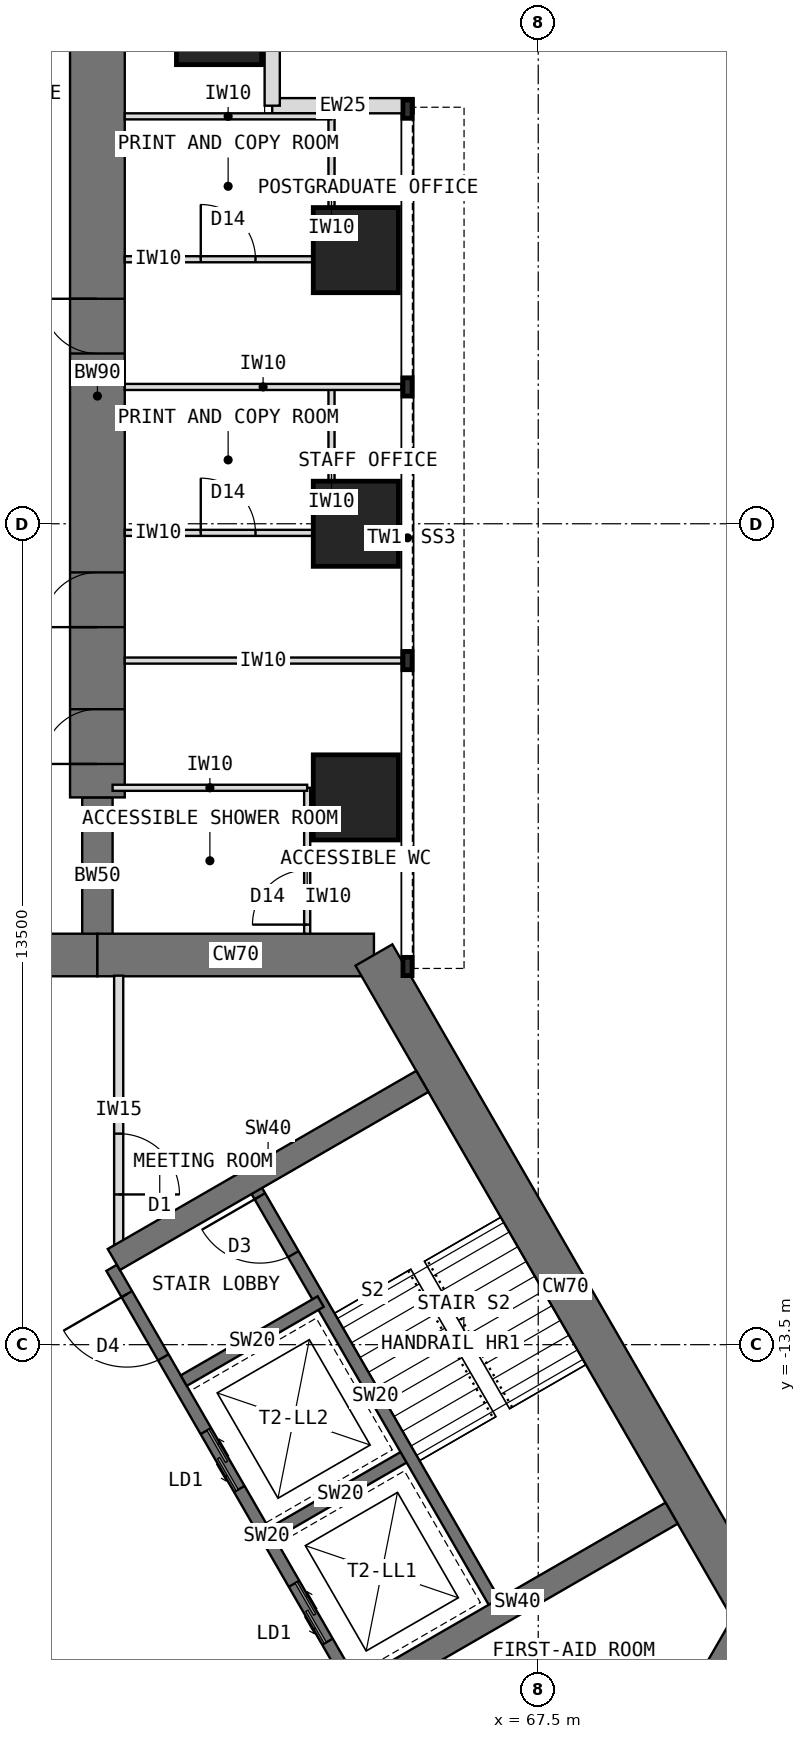
"""IFC4 building model, lengths in metres.
Left out: names, types, materials, properties, quantities, classifications, styles, units other than length and angle.
Written with IfcOpenShell. Run it as: python <this file> out.ifc"""

import sys

from ifc_helpers import new_model, si_unit, direction, frame, frame_2d, origin, origin_2d, place, context, subcontext, project, spatial, rectangle, extrude, element, fill, save


model = new_model("IFC4")
c1 = context("Model", 3, precision=1e-05, world=origin(), true_north=direction((0.0, 1.0)))
c2 = subcontext(c1, "Body", "Model", "MODEL_VIEW")
j1 = project(units=[si_unit("LENGTHUNIT", "METRE"), si_unit("PLANEANGLEUNIT", "RADIAN")], contexts=[c1])
p1 = place(None, origin())
s1 = spatial("IfcSite", under=j1, at=p1, CompositionType="ELEMENT")
p2 = place(p1, origin())
s2 = spatial("IfcBuilding", under=s1, at=p2, CompositionType="ELEMENT")
p3 = place(p2, frame((0.0, 0.0, 84.5)))
s3 = spatial("IfcBuildingStorey", under=s2, at=p3, CompositionType="ELEMENT", Elevation=84.5)
p4 = place(p3, frame((64.798, -7.092, 0.0), z_axis=(0.0, 0.0, 1.0), x_axis=(-1.0, 0.0, 0.0)))
e1 = element("IfcWall", 1, at=p4, inside=s3, PredefinedType="SHEAR", context=c2, shape_type="SweptSolid", body=[
    extrude(rectangle(XDim=4.548, YDim=0.7, at=frame_2d((2.274, 0.0))), origin(), (0.0, 0.0, 1.0), 4.0),
])
p5 = place(p3, frame((60.25, -7.092, 0.0), z_axis=(0.0, 0.0, 1.0), x_axis=(-1.0, 0.0, 0.0)))
e2 = element("IfcWall", 2, at=p5, inside=s3, PredefinedType="SHEAR", context=c2, shape_type="SweptSolid", body=[
    extrude(rectangle(XDim=3.5, YDim=0.7, at=frame_2d((1.75, 0.0))), origin(), (0.0, 0.0, 1.0), 4.0),
])
p6 = place(p5, frame((0.85, 0.0, 0.0)))
e3 = element("IfcOpeningElement", 3, at=p6, cuts=e2, PredefinedType="OPENING", context=c2, shape_type="SweptSolid", body=[
    extrude(rectangle(XDim=1.8, YDim=2.1, at=frame_2d((0.9, 1.05))), frame((0.0, 0.36, 0.0), z_axis=(0.0, -1.0, 0.0), x_axis=(1.0, 0.0, 0.0)), (0.0, 0.0, 1.0), 0.72),
])
p7 = place(p3, frame((68.822, -21.939, 0.0), z_axis=(0.0, 0.0, 1.0), x_axis=(0.500024481964, 0.866011268655, 0.0)))
e4 = element("IfcWall", 4, at=p7, inside=s3, PredefinedType="SHEAR", context=c2, shape_type="SweptSolid", body=[
    extrude(rectangle(XDim=4.548, YDim=0.7, at=frame_2d((2.274, 0.0))), origin(), (0.0, 0.0, 1.0), 4.0),
])
p8 = place(p3, frame((71.096, -18.0, 0.0), z_axis=(0.0, 0.0, 1.0), x_axis=(-0.500005998175, 0.866021940709, 0.0)))
e5 = element("IfcWall", 5, at=p8, inside=s3, PredefinedType="SHEAR", context=c2, shape_type="SweptSolid", body=[
    extrude(rectangle(XDim=12.596, YDim=0.7, at=frame_2d((6.298, 0.0))), origin(), (0.0, 0.0, 1.0), 4.0),
])
p9 = place(p3, frame((60.25, -7.092, 0.0), z_axis=(0.0, 0.0, 1.0), x_axis=(0.0, 1.0, 0.0)))
e6 = element("IfcWall", 6, at=p9, inside=s3, PredefinedType="SHEAR", context=c2, shape_type="SweptSolid", body=[
    extrude(rectangle(XDim=2.592, YDim=0.5, at=frame_2d((1.296, 0.0))), origin(), (0.0, 0.0, 1.0), 4.0),
])
p10 = place(p3, frame((60.25, -4.5, 0.0), z_axis=(0.0, 0.0, 1.0), x_axis=(0.0, 1.0, 0.0)))
e7 = element("IfcWall", 7, at=p10, inside=s3, PredefinedType="SHEAR", context=c2, shape_type="SweptSolid", body=[
    extrude(rectangle(XDim=13.2, YDim=0.9, at=frame_2d((6.6, 0.0))), origin(), (0.0, 0.0, 1.0), 4.0),
])
p11 = place(p10, frame((0.55, 0.0, 0.0)))
e8 = element("IfcOpeningElement", 8, at=p11, cuts=e7, PredefinedType="OPENING", context=c2, shape_type="SweptSolid", body=[
    extrude(rectangle(XDim=0.9, YDim=2.1, at=frame_2d((0.45, 1.05))), frame((0.0, 0.46, 0.0), z_axis=(0.0, -1.0, 0.0), x_axis=(1.0, 0.0, 0.0)), (0.0, 0.0, 1.0), 0.92),
])
p12 = place(p10, frame((2.8, 0.0, 0.0)))
e9 = element("IfcOpeningElement", 9, at=p12, cuts=e7, PredefinedType="OPENING", context=c2, shape_type="SweptSolid", body=[
    extrude(rectangle(XDim=0.9, YDim=2.1, at=frame_2d((0.45, 1.05))), frame((0.0, 0.46, 0.0), z_axis=(0.0, -1.0, 0.0), x_axis=(1.0, 0.0, 0.0)), (0.0, 0.0, 1.0), 0.92),
])
p13 = place(p10, frame((7.3, 0.0, 0.0)))
e10 = element("IfcOpeningElement", 10, at=p13, cuts=e7, PredefinedType="OPENING", context=c2, shape_type="SweptSolid", body=[
    extrude(rectangle(XDim=0.9, YDim=2.1, at=frame_2d((0.45, 1.05))), frame((0.0, 0.46, 0.0), z_axis=(0.0, -1.0, 0.0), x_axis=(1.0, 0.0, 0.0)), (0.0, 0.0, 1.0), 0.92),
])
for number, where, z_axis, x_axis in (
    (11, (64.5, -4.5, 0.0), (0.0, 0.0, 1.0), (1.0, 0.0, 0.0)),
    (12, (64.5, 0.0, 0.0), (0.0, 0.0, 1.0), (1.0, 0.0, 0.0)),
    (13, (64.5, 4.5, 0.0), (0.0, 0.0, 1.0), (1.0, 0.0, 0.0)),
    (14, (62.25, 8.25, 0.0), (0.0, 0.0, 1.0), (1.0, 0.0, 0.0)),
):
    element("IfcColumn", number, at=place(p3, frame(where, z_axis=z_axis, x_axis=x_axis)), inside=s3, PredefinedType="COLUMN", context=c2, shape_type="SweptSolid", body=[
        extrude(rectangle(XDim=1.4, YDim=1.4, at=origin_2d()), origin(), (0.0, 0.0, 1.0), 4.0),
    ])
for number, where, z_axis, x_axis in (
    (15, (65.45, 6.875, 0.0), (0.0, 0.0, 1.0), (-1.0, 0.0, 0.0)),
    (16, (63.125, 6.875, 0.0), (0.0, 0.0, 1.0), (0.0, 1.0, 0.0)),
):
    element("IfcWall", number, at=place(p3, frame(where, z_axis=z_axis, x_axis=x_axis)), inside=s3, PredefinedType="STANDARD", context=c2, shape_type="SweptSolid", body=[
        extrude(rectangle(XDim=2.325, YDim=0.25, at=frame_2d((1.163, 0.0))), origin(), (0.0, 0.0, 1.0), 3.8),
    ])
p14 = place(p3, frame((64.484, -19.164, 0.0), z_axis=(0.0, 0.0, 1.0), x_axis=(-0.49999894854, 0.866026010844, 0.0)))
e17 = element("IfcWall", 17, at=p14, inside=s3, PredefinedType="SHEAR", context=c2, shape_type="SweptSolid", body=[
    extrude(rectangle(XDim=8.0, YDim=0.2, at=frame_2d((4.0, 0.0))), origin(), (0.0, 0.0, 1.0), 4.0),
])
p15 = place(p14, frame((6.3, 0.0, 0.0)))
e18 = element("IfcOpeningElement", 18, at=p15, cuts=e17, PredefinedType="OPENING", context=c2, shape_type="SweptSolid", body=[
    extrude(rectangle(XDim=1.2, YDim=2.1, at=frame_2d((0.6, 1.05))), frame((0.0, 0.11, 0.0), z_axis=(0.0, -1.0, 0.0), x_axis=(1.0, 0.0, 0.0)), (0.0, 0.0, 1.0), 0.22),
])
p16 = place(p14, frame((0.9, 0.0, 0.0)))
e19 = element("IfcOpeningElement", 19, at=p16, cuts=e17, PredefinedType="OPENING", context=c2, shape_type="SweptSolid", body=[
    extrude(rectangle(XDim=1.1, YDim=2.2, at=frame_2d((0.55, 1.1))), frame((0.0, 0.11, 0.0), z_axis=(0.0, -1.0, 0.0), x_axis=(1.0, 0.0, 0.0)), (0.0, 0.0, 1.0), 0.22),
])
p17 = place(p14, frame((3.8, 0.0, 0.0)))
e20 = element("IfcOpeningElement", 20, at=p17, cuts=e17, PredefinedType="OPENING", context=c2, shape_type="SweptSolid", body=[
    extrude(rectangle(XDim=1.1, YDim=2.2, at=frame_2d((0.55, 1.1))), frame((0.0, 0.11, 0.0), z_axis=(0.0, -1.0, 0.0), x_axis=(1.0, 0.0, 0.0)), (0.0, 0.0, 1.0), 0.22),
])
p18 = place(p3, frame((63.12, -16.603, 0.0), z_axis=(0.0, 0.0, 1.0), x_axis=(0.866062058628, 0.499936506574, 0.0)))
e21 = element("IfcWall", 21, at=p18, inside=s3, PredefinedType="SHEAR", context=c2, shape_type="SweptSolid", body=[
    extrude(rectangle(XDim=2.6, YDim=0.2, at=frame_2d((1.3, 0.0))), origin(), (0.0, 0.0, 1.0), 4.0),
])
p19 = place(p3, frame((61.67, -14.091, 0.0), z_axis=(0.0, 0.0, 1.0), x_axis=(0.86603858612, 0.49997716683, 0.0)))
e22 = element("IfcWall", 22, at=p19, inside=s3, PredefinedType="SHEAR", context=c2, shape_type="SweptSolid", body=[
    extrude(rectangle(XDim=2.6, YDim=0.2, at=frame_2d((1.3, 0.0))), origin(), (0.0, 0.0, 1.0), 4.0),
])
p20 = place(p3, frame((66.822, -17.814, 0.0), z_axis=(0.0, 0.0, 1.0), x_axis=(-0.49999894854, 0.866026010844, 0.0)))
e23 = element("IfcWall", 23, at=p20, inside=s3, PredefinedType="SHEAR", context=c2, shape_type="SweptSolid", body=[
    extrude(rectangle(XDim=8.0, YDim=0.2, at=frame_2d((4.0, 0.0))), origin(), (0.0, 0.0, 1.0), 4.0),
])
p21 = place(p20, frame((6.7, 0.0, 0.0)))
e24 = element("IfcOpeningElement", 24, at=p21, cuts=e23, PredefinedType="OPENING", context=c2, shape_type="SweptSolid", body=[
    extrude(rectangle(XDim=1.1, YDim=2.1, at=frame_2d((0.55, 1.05))), frame((0.0, 0.11, 0.0), z_axis=(0.0, -1.0, 0.0), x_axis=(1.0, 0.0, 0.0)), (0.0, 0.0, 1.0), 0.22),
])
for number, where, z_axis, x_axis in (
    (25, (60.52, -12.099, 0.0), (0.0, 0.0, 1.0), (0.866, 0.5, 0.0)),
    (26, (64.62, -19.201, 0.0), (0.0, 0.0, 1.0), (0.866, 0.5, 0.0)),
):
    element("IfcWall", number, at=place(p3, frame(where, z_axis=z_axis, x_axis=x_axis)), inside=s3, PredefinedType="SHEAR", context=c2, shape_type="SweptSolid", body=[
        extrude(rectangle(XDim=5.858, YDim=0.4, at=frame_2d((2.929, 0.0))), origin(), (0.0, 0.0, 1.0), 4.0),
    ])
for number, where, z_axis, x_axis in (
    (27, (60.7, -2.25, 0.0), (0.0, 0.0, 1.0), (1.0, 0.0, 0.0)),
    (28, (60.7, 2.25, 0.0), (0.0, 0.0, 1.0), (1.0, 0.0, 0.0)),
):
    element("IfcWall", number, at=place(p3, frame(where, z_axis=z_axis, x_axis=x_axis)), inside=s3, PredefinedType="PARTITIONING", context=c2, shape_type="SweptSolid", body=[
        extrude(rectangle(XDim=4.55, YDim=0.1, at=frame_2d((2.275, 0.0))), origin(), (0.0, 0.0, 1.0), 3.8),
    ])
p22 = place(p3, frame((64.1, -0.15, 0.0), z_axis=(0.0, 0.0, 1.0), x_axis=(0.0, 1.0, 0.0)))
e29 = element("IfcWall", 29, at=p22, inside=s3, PredefinedType="PARTITIONING", context=c2, shape_type="SweptSolid", body=[
    extrude(rectangle(XDim=2.4, YDim=0.1, at=frame_2d((1.2, 0.0))), origin(), (0.0, 0.0, 1.0), 3.8),
])
p23 = place(p3, frame((60.7, -0.15, 0.0), z_axis=(0.0, 0.0, 1.0), x_axis=(1.0, 0.0, 0.0)))
e30 = element("IfcWall", 30, at=p23, inside=s3, PredefinedType="PARTITIONING", context=c2, shape_type="SweptSolid", body=[
    extrude(rectangle(XDim=3.4, YDim=0.1, at=frame_2d((1.7, 0.0))), origin(), (0.0, 0.0, 1.0), 3.8),
])
p24 = place(p23, frame((1.25, 0.0, 0.0)))
e31 = element("IfcOpeningElement", 31, at=p24, cuts=e30, PredefinedType="OPENING", context=c2, shape_type="SweptSolid", body=[
    extrude(rectangle(XDim=0.9, YDim=2.1, at=frame_2d((0.45, 1.05))), frame((0.0, 0.06, 0.0), z_axis=(0.0, -1.0, 0.0), x_axis=(1.0, 0.0, 0.0)), (0.0, 0.0, 1.0), 0.12),
])
p25 = place(p3, frame((64.1, 4.35, 0.0), z_axis=(0.0, 0.0, 1.0), x_axis=(0.0, 1.0, 0.0)))
e32 = element("IfcWall", 32, at=p25, inside=s3, PredefinedType="PARTITIONING", context=c2, shape_type="SweptSolid", body=[
    extrude(rectangle(XDim=2.4, YDim=0.1, at=frame_2d((1.2, 0.0))), origin(), (0.0, 0.0, 1.0), 3.8),
])
p26 = place(p3, frame((60.7, 4.35, 0.0), z_axis=(0.0, 0.0, 1.0), x_axis=(1.0, 0.0, 0.0)))
e33 = element("IfcWall", 33, at=p26, inside=s3, PredefinedType="PARTITIONING", context=c2, shape_type="SweptSolid", body=[
    extrude(rectangle(XDim=3.4, YDim=0.1, at=frame_2d((1.7, 0.0))), origin(), (0.0, 0.0, 1.0), 3.8),
])
p27 = place(p26, frame((1.25, 0.0, 0.0)))
e34 = element("IfcOpeningElement", 34, at=p27, cuts=e33, PredefinedType="OPENING", context=c2, shape_type="SweptSolid", body=[
    extrude(rectangle(XDim=0.9, YDim=2.1, at=frame_2d((0.45, 1.05))), frame((0.0, 0.06, 0.0), z_axis=(0.0, -1.0, 0.0), x_axis=(1.0, 0.0, 0.0)), (0.0, 0.0, 1.0), 0.12),
])
p28 = place(p3, frame((60.7, 6.7, 0.0), z_axis=(0.0, 0.0, 1.0), x_axis=(1.0, 0.0, 0.0)))
e35 = element("IfcWall", 35, at=p28, inside=s3, PredefinedType="PARTITIONING", context=c2, shape_type="SweptSolid", body=[
    extrude(rectangle(XDim=3.4, YDim=0.1, at=frame_2d((1.7, 0.0))), origin(), (0.0, 0.0, 1.0), 3.8),
])
p29 = place(p3, frame((63.7, -6.742, 0.0), z_axis=(0.0, 0.0, 1.0), x_axis=(0.0, 1.0, 0.0)))
e36 = element("IfcWall", 36, at=p29, inside=s3, PredefinedType="PARTITIONING", context=c2, shape_type="SweptSolid", body=[
    extrude(rectangle(XDim=2.4, YDim=0.1, at=frame_2d((1.2, 0.0))), origin(), (0.0, 0.0, 1.0), 3.8),
])
p30 = place(p29, frame((0.15, 0.0, 0.0)))
e37 = element("IfcOpeningElement", 37, at=p30, cuts=e36, PredefinedType="OPENING", context=c2, shape_type="SweptSolid", body=[
    extrude(rectangle(XDim=0.9, YDim=2.1, at=frame_2d((0.45, 1.05))), frame((0.0, 0.06, 0.0), z_axis=(0.0, -1.0, 0.0), x_axis=(1.0, 0.0, 0.0)), (0.0, 0.0, 1.0), 0.12),
])
p31 = place(p3, frame((60.5, -4.342, 0.0), z_axis=(0.0, 0.0, 1.0), x_axis=(1.0, 0.0, 0.0)))
e38 = element("IfcWall", 38, at=p31, inside=s3, PredefinedType="PARTITIONING", context=c2, shape_type="SweptSolid", body=[
    extrude(rectangle(XDim=3.2, YDim=0.1, at=frame_2d((1.6, 0.0))), origin(), (0.0, 0.0, 1.0), 3.8),
])
p32 = place(p3, frame((60.6, -7.432, 0.0), z_axis=(0.0, 0.0, 1.0), x_axis=(0.0, -1.0, 0.0)))
e39 = element("IfcWall", 39, at=p32, inside=s3, PredefinedType="PARTITIONING", context=c2, shape_type="SweptSolid", body=[
    extrude(rectangle(XDim=4.426, YDim=0.15, at=frame_2d((2.213, 0.0))), origin(), (0.0, 0.0, 1.0), 3.8),
])
p33 = place(p32, frame((2.598, 0.0, 0.0)))
e40 = element("IfcOpeningElement", 40, at=p33, cuts=e39, PredefinedType="OPENING", context=c2, shape_type="SweptSolid", body=[
    extrude(rectangle(XDim=1.0, YDim=2.1, at=frame_2d((0.5, 1.05))), frame((0.0, 0.085, 0.0), z_axis=(0.0, -1.0, 0.0), x_axis=(1.0, 0.0, 0.0)), (0.0, 0.0, 1.0), 0.17),
])
p34 = place(p15, origin())
e41 = element("IfcDoor", 41, at=p34, inside=s3, OperationType="SINGLE_SWING_RIGHT", PredefinedType="DOOR", context=c2, shape_type="SweptSolid", body=[
    extrude(rectangle(XDim=1.2, YDim=2.1, at=frame_2d((0.6, 1.05))), frame((0.0, 0.025, 0.0), z_axis=(0.0, -1.0, 0.0), x_axis=(1.0, 0.0, 0.0)), (0.0, 0.0, 1.0), 0.05),
])
fill(e18, e41)
p35 = place(p16, origin())
e42 = element("IfcDoor", 42, at=p35, inside=s3, OperationType="DOUBLE_DOOR_SLIDING", PredefinedType="DOOR", context=c2, shape_type="SweptSolid", body=[
    extrude(rectangle(XDim=1.1, YDim=2.2, at=frame_2d((0.55, 1.1))), frame((0.0, 0.025, 0.0), z_axis=(0.0, -1.0, 0.0), x_axis=(1.0, 0.0, 0.0)), (0.0, 0.0, 1.0), 0.05),
])
fill(e19, e42)
p36 = place(p17, origin())
e43 = element("IfcDoor", 43, at=p36, inside=s3, OperationType="DOUBLE_DOOR_SLIDING", PredefinedType="DOOR", context=c2, shape_type="SweptSolid", body=[
    extrude(rectangle(XDim=1.1, YDim=2.2, at=frame_2d((0.55, 1.1))), frame((0.0, 0.025, 0.0), z_axis=(0.0, -1.0, 0.0), x_axis=(1.0, 0.0, 0.0)), (0.0, 0.0, 1.0), 0.05),
])
fill(e20, e43)
p37 = place(p21, origin())
e44 = element("IfcDoor", 44, at=p37, inside=s3, OperationType="SINGLE_SWING_RIGHT", PredefinedType="DOOR", context=c2, shape_type="SweptSolid", body=[
    extrude(rectangle(XDim=1.1, YDim=2.1, at=frame_2d((0.55, 1.05))), frame((0.0, 0.025, 0.0), z_axis=(0.0, -1.0, 0.0), x_axis=(1.0, 0.0, 0.0)), (0.0, 0.0, 1.0), 0.05),
])
fill(e24, e44)
p38 = place(p24, origin())
e45 = element("IfcDoor", 45, at=p38, inside=s3, OperationType="SINGLE_SWING_LEFT", PredefinedType="DOOR", context=c2, shape_type="SweptSolid", body=[
    extrude(rectangle(XDim=0.9, YDim=2.1, at=frame_2d((0.45, 1.05))), frame((0.0, 0.025, 0.0), z_axis=(0.0, -1.0, 0.0), x_axis=(1.0, 0.0, 0.0)), (0.0, 0.0, 1.0), 0.05),
])
fill(e31, e45)
p39 = place(p27, origin())
e46 = element("IfcDoor", 46, at=p39, inside=s3, OperationType="SINGLE_SWING_LEFT", PredefinedType="DOOR", context=c2, shape_type="SweptSolid", body=[
    extrude(rectangle(XDim=0.9, YDim=2.1, at=frame_2d((0.45, 1.05))), frame((0.0, 0.025, 0.0), z_axis=(0.0, -1.0, 0.0), x_axis=(1.0, 0.0, 0.0)), (0.0, 0.0, 1.0), 0.05),
])
fill(e34, e46)
p40 = place(p30, origin())
e47 = element("IfcDoor", 47, at=p40, inside=s3, OperationType="SINGLE_SWING_LEFT", PredefinedType="DOOR", context=c2, shape_type="SweptSolid", body=[
    extrude(rectangle(XDim=0.9, YDim=2.1, at=frame_2d((0.45, 1.05))), frame((0.0, 0.025, 0.0), z_axis=(0.0, -1.0, 0.0), x_axis=(1.0, 0.0, 0.0)), (0.0, 0.0, 1.0), 0.05),
])
fill(e37, e47)
p41 = place(p33, origin())
e48 = element("IfcDoor", 48, at=p41, inside=s3, OperationType="SINGLE_SWING_RIGHT", PredefinedType="DOOR", context=c2, shape_type="SweptSolid", body=[
    extrude(rectangle(XDim=1.0, YDim=2.1, at=frame_2d((0.5, 1.05))), frame((0.0, 0.025, 0.0), z_axis=(0.0, -1.0, 0.0), x_axis=(1.0, 0.0, 0.0)), (0.0, 0.0, 1.0), 0.05),
])
fill(e40, e48)
p42 = place(p11, origin())
e49 = element("IfcDoor", 49, at=p42, inside=s3, OperationType="SINGLE_SWING_LEFT", PredefinedType="DOOR", context=c2, shape_type="SweptSolid", body=[
    extrude(rectangle(XDim=0.82, YDim=2.06, at=frame_2d((0.45, 1.03))), frame((0.0, 0.025, 0.0), z_axis=(0.0, -1.0, 0.0), x_axis=(1.0, 0.0, 0.0)), (0.0, 0.0, 1.0), 0.05),
    extrude(rectangle(XDim=0.04, YDim=2.1, at=frame_2d((0.02, 1.05))), frame((0.0, 0.45, 0.0), z_axis=(0.0, -1.0, 0.0), x_axis=(1.0, 0.0, 0.0)), (0.0, 0.0, 1.0), 0.899),
    extrude(rectangle(XDim=0.04, YDim=2.1, at=frame_2d((0.88, 1.05))), frame((0.0, 0.45, 0.0), z_axis=(0.0, -1.0, 0.0), x_axis=(1.0, 0.0, 0.0)), (0.0, 0.0, 1.0), 0.899),
    extrude(rectangle(XDim=0.82, YDim=0.04, at=frame_2d((0.45, 2.08))), frame((0.0, 0.45, 0.0), z_axis=(0.0, -1.0, 0.0), x_axis=(1.0, 0.0, 0.0)), (0.0, 0.0, 1.0), 0.899),
])
fill(e8, e49)
p43 = place(p12, origin())
e50 = element("IfcDoor", 50, at=p43, inside=s3, OperationType="SINGLE_SWING_LEFT", PredefinedType="DOOR", context=c2, shape_type="SweptSolid", body=[
    extrude(rectangle(XDim=0.82, YDim=2.06, at=frame_2d((0.45, 1.03))), frame((0.0, 0.025, 0.0), z_axis=(0.0, -1.0, 0.0), x_axis=(1.0, 0.0, 0.0)), (0.0, 0.0, 1.0), 0.05),
    extrude(rectangle(XDim=0.04, YDim=2.1, at=frame_2d((0.02, 1.05))), frame((0.0, 0.45, 0.0), z_axis=(0.0, -1.0, 0.0), x_axis=(1.0, 0.0, 0.0)), (0.0, 0.0, 1.0), 0.899),
    extrude(rectangle(XDim=0.04, YDim=2.1, at=frame_2d((0.88, 1.05))), frame((0.0, 0.45, 0.0), z_axis=(0.0, -1.0, 0.0), x_axis=(1.0, 0.0, 0.0)), (0.0, 0.0, 1.0), 0.899),
    extrude(rectangle(XDim=0.82, YDim=0.04, at=frame_2d((0.45, 2.08))), frame((0.0, 0.45, 0.0), z_axis=(0.0, -1.0, 0.0), x_axis=(1.0, 0.0, 0.0)), (0.0, 0.0, 1.0), 0.899),
])
fill(e9, e50)
p44 = place(p13, origin())
e51 = element("IfcDoor", 51, at=p44, inside=s3, OperationType="SINGLE_SWING_RIGHT", PredefinedType="DOOR", context=c2, shape_type="SweptSolid", body=[
    extrude(rectangle(XDim=0.82, YDim=2.06, at=frame_2d((0.45, 1.03))), frame((0.0, 0.025, 0.0), z_axis=(0.0, -1.0, 0.0), x_axis=(1.0, 0.0, 0.0)), (0.0, 0.0, 1.0), 0.05),
    extrude(rectangle(XDim=0.04, YDim=2.1, at=frame_2d((0.02, 1.05))), frame((0.0, 0.45, 0.0), z_axis=(0.0, -1.0, 0.0), x_axis=(1.0, 0.0, 0.0)), (0.0, 0.0, 1.0), 0.899),
    extrude(rectangle(XDim=0.04, YDim=2.1, at=frame_2d((0.88, 1.05))), frame((0.0, 0.45, 0.0), z_axis=(0.0, -1.0, 0.0), x_axis=(1.0, 0.0, 0.0)), (0.0, 0.0, 1.0), 0.899),
    extrude(rectangle(XDim=0.82, YDim=0.04, at=frame_2d((0.45, 2.08))), frame((0.0, 0.45, 0.0), z_axis=(0.0, -1.0, 0.0), x_axis=(1.0, 0.0, 0.0)), (0.0, 0.0, 1.0), 0.899),
])
fill(e10, e51)
save(model, sys.argv[1])
